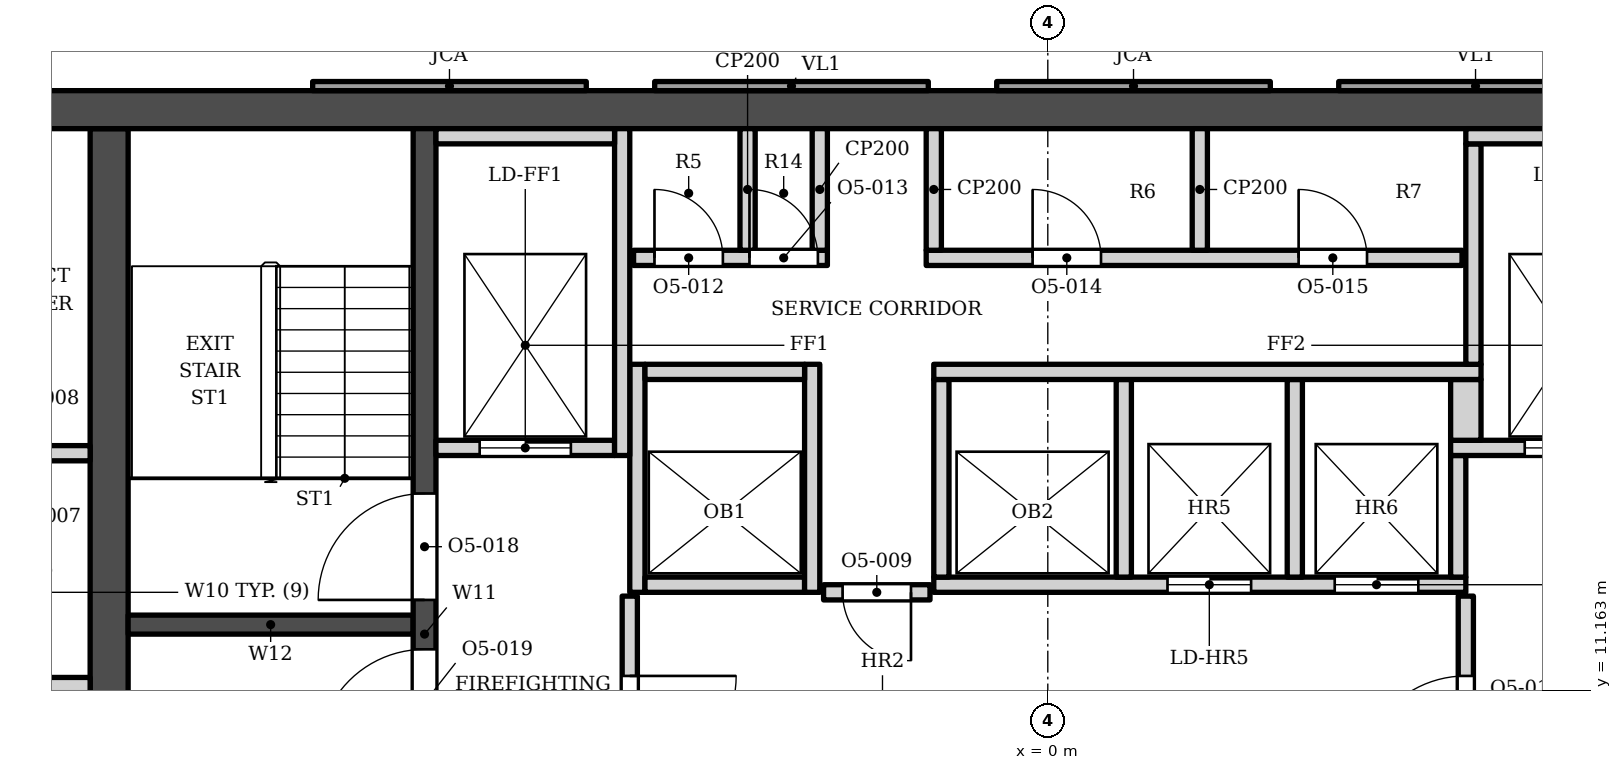
"""IFC4 building model, lengths in metres.
Left out: names, types, materials, properties, quantities, classifications, styles, units other than length and angle.
Written with IfcOpenShell. Run it as: python <this file> out.ifc"""

import sys

from ifc_helpers import new_model, si_unit, direction, frame, frame_2d, origin, place, context, subcontext, project, spatial, polyline, rectangle, outline, extrude, element, fill, save


model = new_model("IFC4")
c1 = context("Model", 3, precision=1e-05, world=origin(), true_north=direction((0.0, 1.0)))
c2 = subcontext(c1, "Body", "Model", "MODEL_VIEW")
j1 = project(units=[si_unit("LENGTHUNIT", "METRE"), si_unit("PLANEANGLEUNIT", "RADIAN")], contexts=[c1])
p1 = place(None, origin())
s1 = spatial("IfcSite", under=j1, at=p1, CompositionType="ELEMENT")
p2 = place(p1, origin())
s2 = spatial("IfcBuilding", under=s1, at=p2, CompositionType="ELEMENT")
p3 = place(p2, frame((0.0, 0.0, 196.4)))
s3 = spatial("IfcBuildingStorey", under=s2, at=p3, CompositionType="ELEMENT", Elevation=196.4)
p4 = place(p3, frame((-13.9, 18.802, 0.0), z_axis=(0.0, 0.0, 1.0), x_axis=(1.0, 0.0, 0.0)))
e1 = element("IfcWall", 1, at=p4, inside=s3, PredefinedType="SHEAR", context=c2, shape_type="SweptSolid", body=[
    extrude(rectangle(XDim=27.8, YDim=0.5, at=frame_2d((13.9, 0.0))), origin(), (0.0, 0.0, 1.0), 3.9),
])
p5 = place(p3, frame((-12.35, 5.253, 0.0), z_axis=(0.0, 0.0, 1.0), x_axis=(0.0, 1.0, 0.0)))
e2 = element("IfcWall", 2, at=p5, inside=s3, PredefinedType="SHEAR", context=c2, shape_type="SweptSolid", body=[
    extrude(rectangle(XDim=13.3, YDim=0.5, at=frame_2d((6.65, 0.0))), origin(), (0.0, 0.0, 1.0), 3.9),
])
p6 = place(p3, frame((-8.2, 5.253, 0.0), z_axis=(0.0, 0.0, 1.0), x_axis=(0.0, 1.0, 0.0)))
e3 = element("IfcWall", 3, at=p6, inside=s3, PredefinedType="SHEAR", context=c2, shape_type="SweptSolid", body=[
    extrude(rectangle(XDim=13.3, YDim=0.3, at=frame_2d((6.65, 0.0))), origin(), (0.0, 0.0, 1.0), 3.9),
])
p7 = place(p6, frame((7.1, 0.0, 0.0)))
e4 = element("IfcOpeningElement", 4, at=p7, cuts=e3, PredefinedType="OPENING", context=c2, shape_type="SweptSolid", body=[
    extrude(rectangle(XDim=1.4, YDim=2.1, at=frame_2d((0.7, 1.05))), frame((0.0, 0.16, 0.0), z_axis=(0.0, -1.0, 0.0), x_axis=(1.0, 0.0, 0.0)), (0.0, 0.0, 1.0), 0.32),
])
p8 = place(p6, frame((5.05, 0.0, 0.0)))
e5 = element("IfcOpeningElement", 5, at=p8, cuts=e3, PredefinedType="OPENING", context=c2, shape_type="SweptSolid", body=[
    extrude(rectangle(XDim=1.4, YDim=2.1, at=frame_2d((0.7, 1.05))), frame((0.0, 0.16, 0.0), z_axis=(0.0, -1.0, 0.0), x_axis=(1.0, 0.0, 0.0)), (0.0, 0.0, 1.0), 0.32),
])
p9 = place(p3, frame((-12.1, 12.028, 0.0), z_axis=(0.0, 0.0, 1.0), x_axis=(1.0, 0.0, 0.0)))
e6 = element("IfcWall", 6, at=p9, inside=s3, PredefinedType="SHEAR", context=c2, shape_type="SweptSolid", body=[
    extrude(rectangle(XDim=3.75, YDim=0.25, at=frame_2d((1.875, 0.0))), origin(), (0.0, 0.0, 1.0), 3.9),
])
p10 = place(p3, origin())
e7 = element("IfcWall", 7, at=p10, inside=s3, PredefinedType="ELEMENTEDWALL", context=c2, shape_type="SweptSolid", body=[
    extrude(outline(polyline([(3.828, 19.173), (3.828, 19.052), (7.428, 19.052), (7.428, 19.173), (3.828, 19.173)])), origin(), (0.0, 0.0, 1.0), 3.0),
])
p11 = place(p3, origin())
e8 = element("IfcWall", 8, at=p11, inside=s3, PredefinedType="SOLIDWALL", context=c2, shape_type="SweptSolid", body=[
    extrude(outline(polyline([(-0.672, 19.173), (-0.672, 19.052), (2.928, 19.052), (2.928, 19.173), (-0.672, 19.173)])), origin(), (0.0, 0.0, 1.0), 3.0),
])
p12 = place(p3, origin())
e9 = element("IfcWall", 9, at=p12, inside=s3, PredefinedType="ELEMENTEDWALL", context=c2, shape_type="SweptSolid", body=[
    extrude(outline(polyline([(-5.172, 19.173), (-5.172, 19.052), (-1.572, 19.052), (-1.572, 19.173), (-5.172, 19.173)])), origin(), (0.0, 0.0, 1.0), 3.0),
])
p13 = place(p3, origin())
e10 = element("IfcWall", 10, at=p13, inside=s3, PredefinedType="SOLIDWALL", context=c2, shape_type="SweptSolid", body=[
    extrude(outline(polyline([(-9.672, 19.173), (-9.672, 19.052), (-6.072, 19.052), (-6.072, 19.173), (-9.672, 19.173)])), origin(), (0.0, 0.0, 1.0), 3.0),
])
p14 = place(p3, frame((-5.5, 9.103, 0.0), z_axis=(0.0, 0.0, 1.0), x_axis=(0.0, 1.0, 0.0)))
e11 = element("IfcWall", 11, at=p14, inside=s3, PredefinedType="SOLIDWALL", context=c2, shape_type="SweptSolid", body=[
    extrude(rectangle(XDim=3.3, YDim=0.2, at=frame_2d((1.65, 0.0))), origin(), (0.0, 0.0, 1.0), 3.73),
])
p15 = place(p14, frame((0.85, 0.0, 0.0)))
e12 = element("IfcOpeningElement", 12, at=p15, cuts=e11, PredefinedType="OPENING", context=c2, shape_type="SweptSolid", body=[
    extrude(rectangle(XDim=1.4, YDim=2.1, at=frame_2d((0.7, 1.05))), frame((0.0, 0.11, 0.0), z_axis=(0.0, -1.0, 0.0), x_axis=(1.0, 0.0, 0.0)), (0.0, 0.0, 1.0), 0.22),
])
p16 = place(p3, frame((5.5, 9.103, 0.0), z_axis=(0.0, 0.0, 1.0), x_axis=(0.0, 1.0, 0.0)))
e13 = element("IfcWall", 13, at=p16, inside=s3, PredefinedType="SOLIDWALL", context=c2, shape_type="SweptSolid", body=[
    extrude(rectangle(XDim=3.3, YDim=0.2, at=frame_2d((1.65, 0.0))), origin(), (0.0, 0.0, 1.0), 3.73),
])
p17 = place(p16, frame((0.85, 0.0, 0.0)))
e14 = element("IfcOpeningElement", 14, at=p17, cuts=e13, PredefinedType="OPENING", context=c2, shape_type="SweptSolid", body=[
    extrude(rectangle(XDim=1.4, YDim=2.1, at=frame_2d((0.7, 1.05))), frame((0.0, 0.11, 0.0), z_axis=(0.0, -1.0, 0.0), x_axis=(1.0, 0.0, 0.0)), (0.0, 0.0, 1.0), 0.22),
])
p18 = place(p3, frame((-13.9, 11.233, 0.0), z_axis=(0.0, 0.0, 1.0), x_axis=(1.0, 0.0, 0.0)))
e15 = element("IfcWall", 15, at=p18, inside=s3, PredefinedType="SOLIDWALL", context=c2, shape_type="SweptSolid", body=[
    extrude(rectangle(XDim=1.3, YDim=0.2, at=frame_2d((0.65, 0.0))), origin(), (0.0, 0.0, 1.0), 3.73),
])
p19 = place(p3, frame((-2.95, 12.453, 0.0), z_axis=(0.0, 0.0, 1.0), x_axis=(1.0, 0.0, 0.0)))
e16 = element("IfcWall", 16, at=p19, inside=s3, PredefinedType="SOLIDWALL", context=c2, shape_type="SweptSolid", body=[
    extrude(rectangle(XDim=1.4, YDim=0.2, at=frame_2d((0.7, 0.0))), origin(), (0.0, 0.0, 1.0), 3.73),
])
p20 = place(p19, frame((0.25, 0.0, 0.0)))
e17 = element("IfcOpeningElement", 17, at=p20, cuts=e16, PredefinedType="OPENING", context=c2, shape_type="SweptSolid", body=[
    extrude(rectangle(XDim=0.9, YDim=2.1, at=frame_2d((0.45, 1.05))), frame((0.0, 0.11, 0.0), z_axis=(0.0, -1.0, 0.0), x_axis=(1.0, 0.0, 0.0)), (0.0, 0.0, 1.0), 0.22),
])
p21 = place(p3, frame((-5.4, 12.453, 0.0), z_axis=(0.0, 0.0, 1.0), x_axis=(0.0, 1.0, 0.0)))
e18 = element("IfcWall", 18, at=p21, inside=s3, PredefinedType="SOLIDWALL", context=c2, shape_type="SweptSolid", body=[
    extrude(rectangle(XDim=3.0, YDim=0.2, at=frame_2d((1.5, 0.0))), origin(), (0.0, 0.0, 1.0), 3.73),
])
p22 = place(p3, frame((-5.3, 12.552, 0.0), z_axis=(0.0, 0.0, 1.0), x_axis=(1.0, 0.0, 0.0)))
e19 = element("IfcWall", 19, at=p22, inside=s3, PredefinedType="SOLIDWALL", context=c2, shape_type="SweptSolid", body=[
    extrude(rectangle(XDim=2.1, YDim=0.2, at=frame_2d((1.05, 0.0))), origin(), (0.0, 0.0, 1.0), 3.73),
])
p23 = place(p3, frame((-3.1, 12.453, 0.0), z_axis=(0.0, 0.0, 1.0), x_axis=(0.0, 1.0, 0.0)))
e20 = element("IfcWall", 20, at=p23, inside=s3, PredefinedType="SOLIDWALL", context=c2, shape_type="SweptSolid", body=[
    extrude(rectangle(XDim=3.0, YDim=0.2, at=frame_2d((1.5, 0.0))), origin(), (0.0, 0.0, 1.0), 3.73),
])
p24 = place(p3, frame((-1.5, 12.552, 0.0), z_axis=(0.0, 0.0, 1.0), x_axis=(1.0, 0.0, 0.0)))
e21 = element("IfcWall", 21, at=p24, inside=s3, PredefinedType="SOLIDWALL", context=c2, shape_type="SweptSolid", body=[
    extrude(rectangle(XDim=7.0, YDim=0.2, at=frame_2d((3.5, 0.0))), origin(), (0.0, 0.0, 1.0), 3.73),
])
p25 = place(p24, frame((3.075, 0.0, 0.0)))
e22 = element("IfcOpeningElement", 22, at=p25, cuts=e21, PredefinedType="OPENING", context=c2, shape_type="SweptSolid", body=[
    extrude(rectangle(XDim=1.1, YDim=2.1, at=frame_2d((0.55, 1.05))), frame((0.0, 0.11, 0.0), z_axis=(0.0, -1.0, 0.0), x_axis=(1.0, 0.0, 0.0)), (0.0, 0.0, 1.0), 0.22),
])
p26 = place(p24, frame((5.275, 0.0, 0.0)))
e23 = element("IfcOpeningElement", 23, at=p26, cuts=e21, PredefinedType="OPENING", context=c2, shape_type="SweptSolid", body=[
    extrude(rectangle(XDim=1.1, YDim=2.1, at=frame_2d((0.55, 1.05))), frame((0.0, 0.11, 0.0), z_axis=(0.0, -1.0, 0.0), x_axis=(1.0, 0.0, 0.0)), (0.0, 0.0, 1.0), 0.22),
])
for number, where, z_axis, x_axis in (
    (24, (-1.4, 12.653, 0.0), (0.0, 0.0, 1.0), (0.0, 1.0, 0.0)),
    (25, (1.0, 12.653, 0.0), (0.0, 0.0, 1.0), (0.0, 1.0, 0.0)),
    (26, (3.25, 12.653, 0.0), (0.0, 0.0, 1.0), (0.0, 1.0, 0.0)),
):
    element("IfcWall", number, at=place(p3, frame(where, z_axis=z_axis, x_axis=x_axis)), inside=s3, PredefinedType="SOLIDWALL", context=c2, shape_type="SweptSolid", body=[
        extrude(rectangle(XDim=2.6, YDim=0.2, at=frame_2d((1.3, 0.0))), origin(), (0.0, 0.0, 1.0), 3.73),
    ])
p27 = place(p3, frame((5.4, 12.653, 0.0), z_axis=(0.0, 0.0, 1.0), x_axis=(0.0, 1.0, 0.0)))
e27 = element("IfcWall", 27, at=p27, inside=s3, PredefinedType="SOLIDWALL", context=c2, shape_type="SweptSolid", body=[
    extrude(rectangle(XDim=1.6, YDim=0.2, at=frame_2d((0.8, 0.0))), origin(), (0.0, 0.0, 1.0), 3.73),
])
p28 = place(p3, frame((-13.9, 14.283, 0.0), z_axis=(0.0, 0.0, 1.0), x_axis=(1.0, 0.0, 0.0)))
e28 = element("IfcWall", 28, at=p28, inside=s3, PredefinedType="SOLIDWALL", context=c2, shape_type="SweptSolid", body=[
    extrude(rectangle(XDim=1.3, YDim=0.2, at=frame_2d((0.65, 0.0))), origin(), (0.0, 0.0, 1.0), 3.73),
])
p29 = place(p3, frame((-8.05, 14.353, 0.0), z_axis=(0.0, 0.0, 1.0), x_axis=(1.0, 0.0, 0.0)))
e29 = element("IfcWall", 29, at=p29, inside=s3, PredefinedType="SOLIDWALL", context=c2, shape_type="SweptSolid", body=[
    extrude(rectangle(XDim=2.35, YDim=0.2, at=frame_2d((1.175, 0.0))), origin(), (0.0, 0.0, 1.0), 3.73),
])
p30 = place(p29, frame((0.575, 0.0, 0.0)))
e30 = element("IfcOpeningElement", 30, at=p30, cuts=e29, PredefinedType="OPENING", context=c2, shape_type="SweptSolid", body=[
    extrude(rectangle(XDim=1.2, YDim=2.1, at=frame_2d((0.6, 1.05))), frame((0.0, 0.11, 0.0), z_axis=(0.0, -1.0, 0.0), x_axis=(1.0, 0.0, 0.0)), (0.0, 0.0, 1.0), 0.22),
])
p31 = place(p3, frame((-5.6, 14.253, 0.0), z_axis=(0.0, 0.0, 1.0), x_axis=(0.0, 1.0, 0.0)))
e31 = element("IfcWall", 31, at=p31, inside=s3, PredefinedType="SOLIDWALL", context=c2, shape_type="SweptSolid", body=[
    extrude(rectangle(XDim=4.3, YDim=0.2, at=frame_2d((2.15, 0.0))), origin(), (0.0, 0.0, 1.0), 3.73),
])
p32 = place(p3, frame((5.3, 14.353, 0.0), z_axis=(0.0, 0.0, 1.0), x_axis=(1.0, 0.0, 0.0)))
e32 = element("IfcWall", 32, at=p32, inside=s3, PredefinedType="SOLIDWALL", context=c2, shape_type="SweptSolid", body=[
    extrude(rectangle(XDim=2.75, YDim=0.2, at=frame_2d((1.375, 0.0))), origin(), (0.0, 0.0, 1.0), 3.73),
])
p33 = place(p32, frame((0.975, 0.0, 0.0)))
e33 = element("IfcOpeningElement", 33, at=p33, cuts=e32, PredefinedType="OPENING", context=c2, shape_type="SweptSolid", body=[
    extrude(rectangle(XDim=1.2, YDim=2.1, at=frame_2d((0.6, 1.05))), frame((0.0, 0.11, 0.0), z_axis=(0.0, -1.0, 0.0), x_axis=(1.0, 0.0, 0.0)), (0.0, 0.0, 1.0), 0.22),
])
p34 = place(p3, frame((5.5, 14.453, 0.0), z_axis=(0.0, 0.0, 1.0), x_axis=(0.0, 1.0, 0.0)))
e34 = element("IfcWall", 34, at=p34, inside=s3, PredefinedType="SOLIDWALL", context=c2, shape_type="SweptSolid", body=[
    extrude(rectangle(XDim=0.8, YDim=0.4, at=frame_2d((0.4, 0.0))), origin(), (0.0, 0.0, 1.0), 3.73),
])
p35 = place(p3, frame((-5.3, 15.353, 0.0), z_axis=(0.0, 0.0, 1.0), x_axis=(1.0, 0.0, 0.0)))
e35 = element("IfcWall", 35, at=p35, inside=s3, PredefinedType="SOLIDWALL", context=c2, shape_type="SweptSolid", body=[
    extrude(rectangle(XDim=2.1, YDim=0.2, at=frame_2d((1.05, 0.0))), origin(), (0.0, 0.0, 1.0), 3.73),
])
p36 = place(p3, frame((-1.5, 15.353, 0.0), z_axis=(0.0, 0.0, 1.0), x_axis=(1.0, 0.0, 0.0)))
e36 = element("IfcWall", 36, at=p36, inside=s3, PredefinedType="SOLIDWALL", context=c2, shape_type="SweptSolid", body=[
    extrude(rectangle(XDim=7.2, YDim=0.2, at=frame_2d((3.6, 0.0))), origin(), (0.0, 0.0, 1.0), 3.73),
])
p37 = place(p3, frame((5.6, 15.453, 0.0), z_axis=(0.0, 0.0, 1.0), x_axis=(0.0, 1.0, 0.0)))
e37 = element("IfcWall", 37, at=p37, inside=s3, PredefinedType="SOLIDWALL", context=c2, shape_type="SweptSolid", body=[
    extrude(rectangle(XDim=2.9, YDim=0.2, at=frame_2d((1.45, 0.0))), origin(), (0.0, 0.0, 1.0), 3.73),
])
p38 = place(p3, frame((-5.45, 16.853, 0.0), z_axis=(0.0, 0.0, 1.0), x_axis=(1.0, 0.0, 0.0)))
e38 = element("IfcWall", 38, at=p38, inside=s3, PredefinedType="SOLIDWALL", context=c2, shape_type="SweptSolid", body=[
    extrude(rectangle(XDim=2.55, YDim=0.2, at=frame_2d((1.275, 0.0))), origin(), (0.0, 0.0, 1.0), 3.73),
])
p39 = place(p38, frame((0.275, 0.0, 0.0)))
e39 = element("IfcOpeningElement", 39, at=p39, cuts=e38, PredefinedType="OPENING", context=c2, shape_type="SweptSolid", body=[
    extrude(rectangle(XDim=0.9, YDim=2.1, at=frame_2d((0.45, 1.05))), frame((0.0, 0.11, 0.0), z_axis=(0.0, -1.0, 0.0), x_axis=(1.0, 0.0, 0.0)), (0.0, 0.0, 1.0), 0.22),
])
p40 = place(p38, frame((1.525, 0.0, 0.0)))
e40 = element("IfcOpeningElement", 40, at=p40, cuts=e38, PredefinedType="OPENING", context=c2, shape_type="SweptSolid", body=[
    extrude(rectangle(XDim=0.9, YDim=2.1, at=frame_2d((0.45, 1.05))), frame((0.0, 0.11, 0.0), z_axis=(0.0, -1.0, 0.0), x_axis=(1.0, 0.0, 0.0)), (0.0, 0.0, 1.0), 0.22),
])
p41 = place(p3, frame((-1.6, 16.853, 0.0), z_axis=(0.0, 0.0, 1.0), x_axis=(1.0, 0.0, 0.0)))
e41 = element("IfcWall", 41, at=p41, inside=s3, PredefinedType="SOLIDWALL", context=c2, shape_type="SweptSolid", body=[
    extrude(rectangle(XDim=7.05, YDim=0.2, at=frame_2d((3.525, 0.0))), origin(), (0.0, 0.0, 1.0), 3.73),
])
p42 = place(p41, frame((1.4, 0.0, 0.0)))
e42 = element("IfcOpeningElement", 42, at=p42, cuts=e41, PredefinedType="OPENING", context=c2, shape_type="SweptSolid", body=[
    extrude(rectangle(XDim=0.9, YDim=2.1, at=frame_2d((0.45, 1.05))), frame((0.0, 0.11, 0.0), z_axis=(0.0, -1.0, 0.0), x_axis=(1.0, 0.0, 0.0)), (0.0, 0.0, 1.0), 0.22),
])
p43 = place(p41, frame((4.9, 0.0, 0.0)))
e43 = element("IfcOpeningElement", 43, at=p43, cuts=e41, PredefinedType="OPENING", context=c2, shape_type="SweptSolid", body=[
    extrude(rectangle(XDim=0.9, YDim=2.1, at=frame_2d((0.45, 1.05))), frame((0.0, 0.11, 0.0), z_axis=(0.0, -1.0, 0.0), x_axis=(1.0, 0.0, 0.0)), (0.0, 0.0, 1.0), 0.22),
])
for number, where, z_axis, x_axis in (
    (44, (-3.95, 16.953, 0.0), (0.0, 0.0, 1.0), (0.0, 1.0, 0.0)),
    (45, (-3.0, 16.953, 0.0), (0.0, 0.0, 1.0), (0.0, 1.0, 0.0)),
    (46, (-1.5, 16.953, 0.0), (0.0, 0.0, 1.0), (0.0, 1.0, 0.0)),
    (47, (2.0, 16.953, 0.0), (0.0, 0.0, 1.0), (0.0, 1.0, 0.0)),
):
    element("IfcWall", number, at=place(p3, frame(where, z_axis=z_axis, x_axis=x_axis)), inside=s3, PredefinedType="PARTITIONING", context=c2, shape_type="SweptSolid", body=[
        extrude(rectangle(XDim=1.6, YDim=0.2, at=frame_2d((0.8, 0.0))), origin(), (0.0, 0.0, 1.0), 3.73),
    ])
p44 = place(p3, frame((-8.05, 18.453, 0.0), z_axis=(0.0, 0.0, 1.0), x_axis=(1.0, 0.0, 0.0)))
e48 = element("IfcWall", 48, at=p44, inside=s3, PredefinedType="SOLIDWALL", context=c2, shape_type="SweptSolid", body=[
    extrude(rectangle(XDim=2.35, YDim=0.2, at=frame_2d((1.175, 0.0))), origin(), (0.0, 0.0, 1.0), 3.73),
])
p45 = place(p3, frame((5.5, 18.453, 0.0), z_axis=(0.0, 0.0, 1.0), x_axis=(1.0, 0.0, 0.0)))
e49 = element("IfcWall", 49, at=p45, inside=s3, PredefinedType="SOLIDWALL", context=c2, shape_type="SweptSolid", body=[
    extrude(rectangle(XDim=2.55, YDim=0.2, at=frame_2d((1.275, 0.0))), origin(), (0.0, 0.0, 1.0), 3.73),
])
p46 = place(p25, origin())
e50 = element("IfcDoor", 50, at=p46, inside=s3, OperationType="DOUBLE_DOOR_SLIDING", PredefinedType="DOOR", context=c2, shape_type="SweptSolid", body=[
    extrude(rectangle(XDim=1.1, YDim=2.1, at=frame_2d((0.55, 1.05))), frame((0.0, 0.025, 0.0), z_axis=(0.0, -1.0, 0.0), x_axis=(1.0, 0.0, 0.0)), (0.0, 0.0, 1.0), 0.05),
])
fill(e22, e50)
p47 = place(p26, origin())
e51 = element("IfcDoor", 51, at=p47, inside=s3, OperationType="DOUBLE_DOOR_SLIDING", PredefinedType="DOOR", context=c2, shape_type="SweptSolid", body=[
    extrude(rectangle(XDim=1.1, YDim=2.1, at=frame_2d((0.55, 1.05))), frame((0.0, 0.025, 0.0), z_axis=(0.0, -1.0, 0.0), x_axis=(1.0, 0.0, 0.0)), (0.0, 0.0, 1.0), 0.05),
])
fill(e23, e51)
p48 = place(p30, origin())
e52 = element("IfcDoor", 52, at=p48, inside=s3, OperationType="DOUBLE_DOOR_SLIDING", PredefinedType="DOOR", context=c2, shape_type="SweptSolid", body=[
    extrude(rectangle(XDim=1.2, YDim=2.1, at=frame_2d((0.6, 1.05))), frame((0.0, 0.025, 0.0), z_axis=(0.0, -1.0, 0.0), x_axis=(1.0, 0.0, 0.0)), (0.0, 0.0, 1.0), 0.05),
])
fill(e30, e52)
p49 = place(p33, origin())
e53 = element("IfcDoor", 53, at=p49, inside=s3, OperationType="DOUBLE_DOOR_SLIDING", PredefinedType="DOOR", context=c2, shape_type="SweptSolid", body=[
    extrude(rectangle(XDim=1.2, YDim=2.1, at=frame_2d((0.6, 1.05))), frame((0.0, 0.025, 0.0), z_axis=(0.0, -1.0, 0.0), x_axis=(1.0, 0.0, 0.0)), (0.0, 0.0, 1.0), 0.05),
])
fill(e33, e53)
p50 = place(p7, origin())
e54 = element("IfcDoor", 54, at=p50, inside=s3, OperationType="SINGLE_SWING_LEFT", PredefinedType="DOOR", context=c2, shape_type="SweptSolid", body=[
    extrude(rectangle(XDim=1.4, YDim=2.1, at=frame_2d((0.7, 1.05))), frame((0.0, 0.025, 0.0), z_axis=(0.0, -1.0, 0.0), x_axis=(1.0, 0.0, 0.0)), (0.0, 0.0, 1.0), 0.05),
])
fill(e4, e54)
p51 = place(p8, origin())
e55 = element("IfcDoor", 55, at=p51, inside=s3, OperationType="SINGLE_SWING_LEFT", PredefinedType="DOOR", context=c2, shape_type="SweptSolid", body=[
    extrude(rectangle(XDim=1.4, YDim=2.1, at=frame_2d((0.7, 1.05))), frame((0.0, 0.025, 0.0), z_axis=(0.0, -1.0, 0.0), x_axis=(1.0, 0.0, 0.0)), (0.0, 0.0, 1.0), 0.05),
])
fill(e5, e55)
p52 = place(p20, origin())
e56 = element("IfcDoor", 56, at=p52, inside=s3, OperationType="SINGLE_SWING_RIGHT", PredefinedType="DOOR", context=c2, shape_type="SweptSolid", body=[
    extrude(rectangle(XDim=0.9, YDim=2.1, at=frame_2d((0.45, 1.05))), frame((0.0, 0.025, 0.0), z_axis=(0.0, -1.0, 0.0), x_axis=(1.0, 0.0, 0.0)), (0.0, 0.0, 1.0), 0.05),
])
fill(e17, e56)
p53 = place(p15, origin())
e57 = element("IfcDoor", 57, at=p53, inside=s3, OperationType="SINGLE_SWING_RIGHT", PredefinedType="DOOR", context=c2, shape_type="SweptSolid", body=[
    extrude(rectangle(XDim=1.4, YDim=2.1, at=frame_2d((0.7, 1.05))), frame((0.0, 0.025, 0.0), z_axis=(0.0, -1.0, 0.0), x_axis=(1.0, 0.0, 0.0)), (0.0, 0.0, 1.0), 0.05),
])
fill(e12, e57)
p54 = place(p17, origin())
e58 = element("IfcDoor", 58, at=p54, inside=s3, OperationType="SINGLE_SWING_LEFT", PredefinedType="DOOR", context=c2, shape_type="SweptSolid", body=[
    extrude(rectangle(XDim=1.4, YDim=2.1, at=frame_2d((0.7, 1.05))), frame((0.0, 0.025, 0.0), z_axis=(0.0, -1.0, 0.0), x_axis=(1.0, 0.0, 0.0)), (0.0, 0.0, 1.0), 0.05),
])
fill(e14, e58)
p55 = place(p39, origin())
e59 = element("IfcDoor", 59, at=p55, inside=s3, OperationType="SINGLE_SWING_LEFT", PredefinedType="DOOR", context=c2, shape_type="SweptSolid", body=[
    extrude(rectangle(XDim=0.9, YDim=2.1, at=frame_2d((0.45, 1.05))), frame((0.0, 0.025, 0.0), z_axis=(0.0, -1.0, 0.0), x_axis=(1.0, 0.0, 0.0)), (0.0, 0.0, 1.0), 0.05),
])
fill(e39, e59)
p56 = place(p40, origin())
e60 = element("IfcDoor", 60, at=p56, inside=s3, OperationType="SINGLE_SWING_LEFT", PredefinedType="DOOR", context=c2, shape_type="SweptSolid", body=[
    extrude(rectangle(XDim=0.9, YDim=2.1, at=frame_2d((0.45, 1.05))), frame((0.0, 0.025, 0.0), z_axis=(0.0, -1.0, 0.0), x_axis=(1.0, 0.0, 0.0)), (0.0, 0.0, 1.0), 0.05),
])
fill(e40, e60)
p57 = place(p42, origin())
e61 = element("IfcDoor", 61, at=p57, inside=s3, OperationType="SINGLE_SWING_LEFT", PredefinedType="DOOR", context=c2, shape_type="SweptSolid", body=[
    extrude(rectangle(XDim=0.9, YDim=2.1, at=frame_2d((0.45, 1.05))), frame((0.0, 0.025, 0.0), z_axis=(0.0, -1.0, 0.0), x_axis=(1.0, 0.0, 0.0)), (0.0, 0.0, 1.0), 0.05),
])
fill(e42, e61)
p58 = place(p43, origin())
e62 = element("IfcDoor", 62, at=p58, inside=s3, OperationType="SINGLE_SWING_LEFT", PredefinedType="DOOR", context=c2, shape_type="SweptSolid", body=[
    extrude(rectangle(XDim=0.9, YDim=2.1, at=frame_2d((0.45, 1.05))), frame((0.0, 0.025, 0.0), z_axis=(0.0, -1.0, 0.0), x_axis=(1.0, 0.0, 0.0)), (0.0, 0.0, 1.0), 0.05),
])
fill(e43, e62)
save(model, sys.argv[1])
